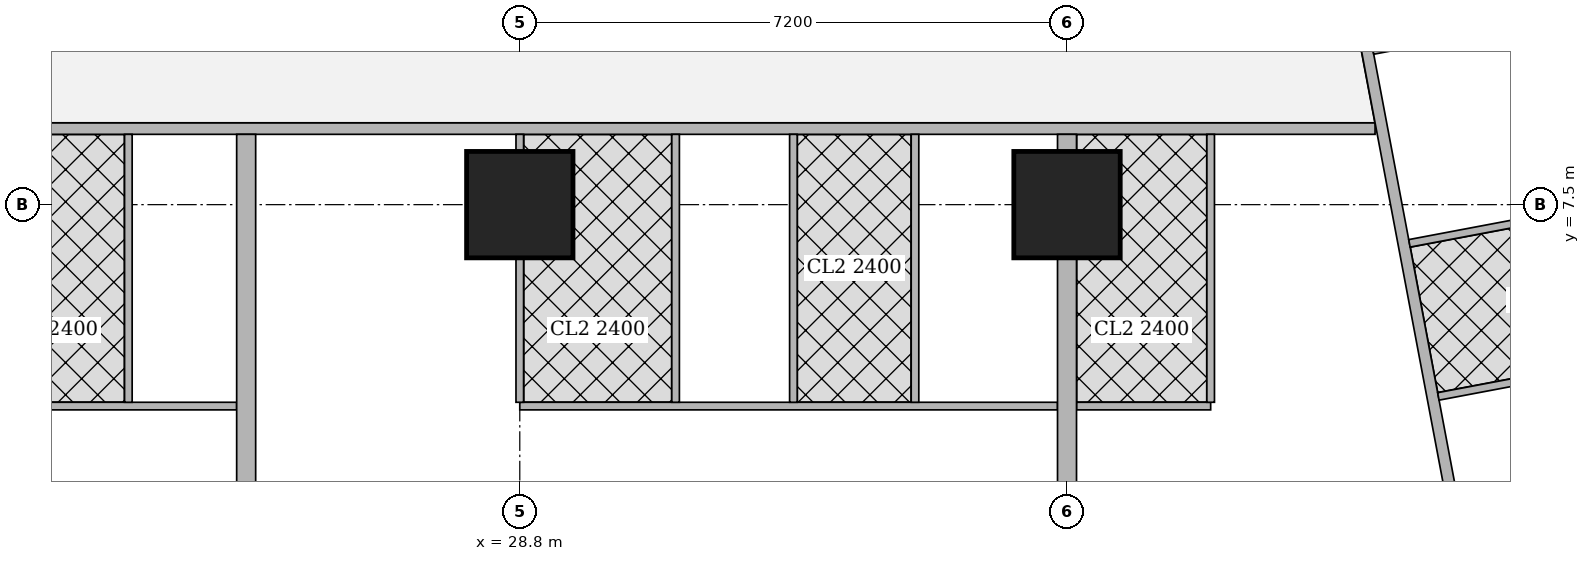
"""IFC4 building model, lengths in metres.
Left out: names, types, materials, properties, quantities, classifications, styles, units other than length and angle.
Written with IfcOpenShell. Run it as: python <this file> out.ifc"""

import sys

from ifc_helpers import new_model, si_unit, direction, frame, frame_2d, origin, origin_2d, place, context, subcontext, project, spatial, rectangle, extrude, element, fill, save


model = new_model("IFC4")
c1 = context("Model", 3, precision=1e-05, world=origin(), true_north=direction((0.0, 1.0)))
c2 = subcontext(c1, "Body", "Model", "MODEL_VIEW")
j1 = project(units=[si_unit("LENGTHUNIT", "METRE"), si_unit("PLANEANGLEUNIT", "RADIAN")], contexts=[c1])
p1 = place(None, origin())
s1 = spatial("IfcSite", under=j1, at=p1, CompositionType="ELEMENT")
p2 = place(p1, origin())
s2 = spatial("IfcBuilding", under=s1, at=p2, CompositionType="ELEMENT")
p3 = place(p2, frame((0.0, 0.0, 223.7)))
s3 = spatial("IfcBuildingStorey", under=s2, at=p3, CompositionType="ELEMENT", Elevation=223.7)
for number, where, z_axis, x_axis in (
    (1, (28.8, 7.5, 0.0), (0.0, 0.0, 1.0), (1.0, 0.0, 0.0)),
    (2, (36.0, 7.5, 0.0), (0.0, 0.0, 1.0), (1.0, 0.0, 0.0)),
):
    element("IfcColumn", number, at=place(p3, frame(where, z_axis=z_axis, x_axis=x_axis)), inside=s3, PredefinedType="COLUMN", context=c2, shape_type="SweptSolid", body=[
        extrude(rectangle(XDim=1.4, YDim=1.4, at=origin_2d()), origin(), (0.0, 0.0, 1.0), 3.75),
    ])
p4 = place(p3, frame((40.053, 8.5, 0.0), z_axis=(0.0, 0.0, 1.0), x_axis=(-1.0, 0.0, 0.0)))
e3 = element("IfcWall", 3, at=p4, inside=s3, PredefinedType="SOLIDWALL", context=c2, shape_type="SweptSolid", body=[
    extrude(rectangle(XDim=23.798, YDim=0.15, at=frame_2d((11.899, 0.0))), origin(), (0.0, 0.0, 1.0), 3.5),
])
p5 = place(p4, frame((21.978, 0.0, 0.0)))
e4 = element("IfcOpeningElement", 4, at=p5, cuts=e3, PredefinedType="OPENING", context=c2, shape_type="SweptSolid", body=[
    extrude(rectangle(XDim=1.0, YDim=2.1, at=frame_2d((0.5, 1.05))), frame((0.0, 0.085, 0.0), z_axis=(0.0, -1.0, 0.0), x_axis=(1.0, 0.0, 0.0)), (0.0, 0.0, 1.0), 0.17),
])
p6 = place(p4, frame((12.753, 0.0, 0.0)))
e5 = element("IfcOpeningElement", 5, at=p6, cuts=e3, PredefinedType="OPENING", context=c2, shape_type="SweptSolid", body=[
    extrude(rectangle(XDim=1.0, YDim=2.1, at=frame_2d((0.5, 1.05))), frame((0.0, 0.085, 0.0), z_axis=(0.0, -1.0, 0.0), x_axis=(1.0, 0.0, 0.0)), (0.0, 0.0, 1.0), 0.17),
])
p7 = place(p4, frame((0.15, 0.0, 0.0)))
e6 = element("IfcOpeningElement", 6, at=p7, cuts=e3, PredefinedType="OPENING", context=c2, shape_type="SweptSolid", body=[
    extrude(rectangle(XDim=1.0, YDim=2.1, at=frame_2d((0.5, 1.05))), frame((0.0, 0.085, 0.0), z_axis=(0.0, -1.0, 0.0), x_axis=(1.0, 0.0, 0.0)), (0.0, 0.0, 1.0), 0.17),
])
p8 = place(p3, frame((33.68, 42.723, 0.0), z_axis=(0.0, 0.0, 1.0), x_axis=(0.185601160014, -0.982625162207, 0.0)))
e7 = element("IfcWall", 7, at=p8, inside=s3, PredefinedType="SOLIDWALL", context=c2, shape_type="SweptSolid", body=[
    extrude(rectangle(XDim=41.051, YDim=0.15, at=frame_2d((20.526, 0.0))), origin(), (0.0, 0.0, 1.0), 2.5),
])
p9 = place(p8, frame((16.123, 0.0, 0.0)))
e8 = element("IfcOpeningElement", 8, at=p9, cuts=e7, PredefinedType="OPENING", context=c2, shape_type="SweptSolid", body=[
    extrude(rectangle(XDim=1.0, YDim=2.1, at=frame_2d((0.5, 1.05))), frame((0.0, 0.085, 0.0), z_axis=(0.0, -1.0, 0.0), x_axis=(1.0, 0.0, 0.0)), (0.0, 0.0, 1.0), 0.17),
])
p10 = place(p8, frame((19.938, 0.0, 0.0)))
e9 = element("IfcOpeningElement", 9, at=p10, cuts=e7, PredefinedType="OPENING", context=c2, shape_type="SweptSolid", body=[
    extrude(rectangle(XDim=1.0, YDim=2.1, at=frame_2d((0.5, 1.05))), frame((0.0, 0.085, 0.0), z_axis=(0.0, -1.0, 0.0), x_axis=(1.0, 0.0, 0.0)), (0.0, 0.0, 1.0), 0.17),
])
p11 = place(p8, frame((30.902, 0.0, 0.0)))
e10 = element("IfcOpeningElement", 10, at=p11, cuts=e7, PredefinedType="OPENING", context=c2, shape_type="SweptSolid", body=[
    extrude(rectangle(XDim=1.0, YDim=2.1, at=frame_2d((0.5, 1.05))), frame((0.0, 0.085, 0.0), z_axis=(0.0, -1.0, 0.0), x_axis=(1.0, 0.0, 0.0)), (0.0, 0.0, 1.0), 0.17),
])
p12 = place(p3, frame((25.075, 4.85, 0.0), z_axis=(0.0, 0.0, 1.0), x_axis=(-1.0, 0.0, 0.0)))
e11 = element("IfcWall", 11, at=p12, inside=s3, PredefinedType="PARTITIONING", context=c2, shape_type="SweptSolid", body=[
    extrude(rectangle(XDim=3.475, YDim=0.1, at=frame_2d((1.737, 0.0))), origin(), (0.0, 0.0, 1.0), 3.5),
])
p13 = place(p12, frame((2.0, 0.0, 0.0)))
e12 = element("IfcOpeningElement", 12, at=p13, cuts=e11, PredefinedType="OPENING", context=c2, shape_type="SweptSolid", body=[
    extrude(rectangle(XDim=0.9, YDim=2.1, at=frame_2d((0.45, 1.05))), frame((0.0, 0.06, 0.0), z_axis=(0.0, -1.0, 0.0), x_axis=(1.0, 0.0, 0.0)), (0.0, 0.0, 1.0), 0.12),
])
p14 = place(p12, frame((0.2, 0.0, 0.0)))
e13 = element("IfcOpeningElement", 13, at=p14, cuts=e11, PredefinedType="OPENING", context=c2, shape_type="SweptSolid", body=[
    extrude(rectangle(XDim=0.9, YDim=2.1, at=frame_2d((0.45, 1.05))), frame((0.0, 0.06, 0.0), z_axis=(0.0, -1.0, 0.0), x_axis=(1.0, 0.0, 0.0)), (0.0, 0.0, 1.0), 0.12),
])
p15 = place(p3, frame((23.65, 4.9, 0.0), z_axis=(0.0, 0.0, 1.0), x_axis=(0.0, 1.0, 0.0)))
e14 = element("IfcWall", 14, at=p15, inside=s3, PredefinedType="PARTITIONING", context=c2, shape_type="SweptSolid", body=[
    extrude(rectangle(XDim=3.525, YDim=0.1, at=frame_2d((1.763, 0.0))), origin(), (0.0, 0.0, 1.0), 3.5),
])
p16 = place(p3, frame((35.875, 4.85, 0.0), z_axis=(0.0, 0.0, 1.0), x_axis=(-1.0, 0.0, 0.0)))
e15 = element("IfcWall", 15, at=p16, inside=s3, PredefinedType="PARTITIONING", context=c2, shape_type="SweptSolid", body=[
    extrude(rectangle(XDim=7.075, YDim=0.1, at=frame_2d((3.538, 0.0))), origin(), (0.0, 0.0, 1.0), 3.5),
])
p17 = place(p16, frame((5.6, 0.0, 0.0)))
e16 = element("IfcOpeningElement", 16, at=p17, cuts=e15, PredefinedType="OPENING", context=c2, shape_type="SweptSolid", body=[
    extrude(rectangle(XDim=0.9, YDim=2.1, at=frame_2d((0.45, 1.05))), frame((0.0, 0.06, 0.0), z_axis=(0.0, -1.0, 0.0), x_axis=(1.0, 0.0, 0.0)), (0.0, 0.0, 1.0), 0.12),
])
p18 = place(p16, frame((2.225, 0.0, 0.0)))
e17 = element("IfcOpeningElement", 17, at=p18, cuts=e15, PredefinedType="OPENING", context=c2, shape_type="SweptSolid", body=[
    extrude(rectangle(XDim=0.9, YDim=2.1, at=frame_2d((0.45, 1.05))), frame((0.0, 0.06, 0.0), z_axis=(0.0, -1.0, 0.0), x_axis=(1.0, 0.0, 0.0)), (0.0, 0.0, 1.0), 0.12),
])
p19 = place(p16, frame((3.8, 0.0, 0.0)))
e18 = element("IfcOpeningElement", 18, at=p19, cuts=e15, PredefinedType="OPENING", context=c2, shape_type="SweptSolid", body=[
    extrude(rectangle(XDim=0.9, YDim=2.1, at=frame_2d((0.45, 1.05))), frame((0.0, 0.06, 0.0), z_axis=(0.0, -1.0, 0.0), x_axis=(1.0, 0.0, 0.0)), (0.0, 0.0, 1.0), 0.12),
])
p20 = place(p16, frame((0.425, 0.0, 0.0)))
e19 = element("IfcOpeningElement", 19, at=p20, cuts=e15, PredefinedType="OPENING", context=c2, shape_type="SweptSolid", body=[
    extrude(rectangle(XDim=0.9, YDim=2.1, at=frame_2d((0.45, 1.05))), frame((0.0, 0.06, 0.0), z_axis=(0.0, -1.0, 0.0), x_axis=(1.0, 0.0, 0.0)), (0.0, 0.0, 1.0), 0.12),
])
p21 = place(p3, frame((28.8, 4.9, 0.0), z_axis=(0.0, 0.0, 1.0), x_axis=(0.0, 1.0, 0.0)))
e20 = element("IfcWall", 20, at=p21, inside=s3, PredefinedType="PARTITIONING", context=c2, shape_type="SweptSolid", body=[
    extrude(rectangle(XDim=1.899, YDim=0.1, at=frame_2d((0.95, 0.0))), origin(), (0.0, 0.0, 1.0), 3.5),
])
p22 = place(p3, frame((28.8, 8.201, 0.0), z_axis=(0.0, 0.0, 1.0), x_axis=(0.0, 1.0, 0.0)))
e21 = element("IfcWall", 21, at=p22, inside=s3, PredefinedType="PARTITIONING", context=c2, shape_type="SweptSolid", body=[
    extrude(rectangle(XDim=0.224, YDim=0.1, at=frame_2d((0.112, 0.0))), origin(), (0.0, 0.0, 1.0), 3.5),
])
for number, where, z_axis, x_axis in (
    (22, (32.4, 4.9, 0.0), (0.0, 0.0, 1.0), (0.0, 1.0, 0.0)),
    (23, (30.85, 4.9, 0.0), (0.0, 0.0, 1.0), (0.0, 1.0, 0.0)),
    (24, (34.0, 4.9, 0.0), (0.0, 0.0, 1.0), (0.0, 1.0, 0.0)),
):
    element("IfcWall", number, at=place(p3, frame(where, z_axis=z_axis, x_axis=x_axis)), inside=s3, PredefinedType="PARTITIONING", context=c2, shape_type="SweptSolid", body=[
        extrude(rectangle(XDim=3.525, YDim=0.1, at=frame_2d((1.763, 0.0))), origin(), (0.0, 0.0, 1.0), 3.5),
    ])
p23 = place(p3, frame((25.2, 3.65, 0.0), z_axis=(0.0, 0.0, 1.0), x_axis=(0.0, 1.0, 0.0)))
e25 = element("IfcWall", 25, at=p23, inside=s3, PredefinedType="SOLIDWALL", context=c2, shape_type="SweptSolid", body=[
    extrude(rectangle(XDim=4.775, YDim=0.25, at=frame_2d((2.388, 0.0))), origin(), (0.0, 0.0, 1.0), 3.5),
])
p24 = place(p3, frame((37.89, 4.85, 0.0), z_axis=(0.0, 0.0, 1.0), x_axis=(-1.0, 0.0, 0.0)))
e26 = element("IfcWall", 26, at=p24, inside=s3, PredefinedType="PARTITIONING", context=c2, shape_type="SweptSolid", body=[
    extrude(rectangle(XDim=1.765, YDim=0.1, at=frame_2d((0.882, 0.0))), origin(), (0.0, 0.0, 1.0), 3.5),
])
p25 = place(p24, frame((0.49, 0.0, 0.0)))
e27 = element("IfcOpeningElement", 27, at=p25, cuts=e26, PredefinedType="OPENING", context=c2, shape_type="SweptSolid", body=[
    extrude(rectangle(XDim=0.9, YDim=2.1, at=frame_2d((0.45, 1.05))), frame((0.0, 0.06, 0.0), z_axis=(0.0, -1.0, 0.0), x_axis=(1.0, 0.0, 0.0)), (0.0, 0.0, 1.0), 0.12),
])
p26 = place(p3, frame((37.89, 4.9, 0.0), z_axis=(0.0, 0.0, 1.0), x_axis=(0.0, 1.0, 0.0)))
e28 = element("IfcWall", 28, at=p26, inside=s3, PredefinedType="PARTITIONING", context=c2, shape_type="SweptSolid", body=[
    extrude(rectangle(XDim=3.525, YDim=0.1, at=frame_2d((1.763, 0.0))), origin(), (0.0, 0.0, 1.0), 3.5),
])
p27 = place(p3, frame((36.0, 3.65, 0.0), z_axis=(0.0, 0.0, 1.0), x_axis=(0.0, 1.0, 0.0)))
e29 = element("IfcWall", 29, at=p27, inside=s3, PredefinedType="SOLIDWALL", context=c2, shape_type="SweptSolid", body=[
    extrude(rectangle(XDim=3.149, YDim=0.25, at=frame_2d((1.575, 0.0))), origin(), (0.0, 0.0, 1.0), 3.5),
])
p28 = place(p3, frame((36.0, 8.201, 0.0), z_axis=(0.0, 0.0, 1.0), x_axis=(0.0, 1.0, 0.0)))
e30 = element("IfcWall", 30, at=p28, inside=s3, PredefinedType="SOLIDWALL", context=c2, shape_type="SweptSolid", body=[
    extrude(rectangle(XDim=0.224, YDim=0.25, at=frame_2d((0.112, 0.0))), origin(), (0.0, 0.0, 1.0), 3.5),
])
p29 = place(p3, frame((43.49, 10.183, 0.0), z_axis=(0.0, 0.0, 1.0), x_axis=(-0.982588017646, -0.185797706064, 0.0)))
e31 = element("IfcWall", 31, at=p29, inside=s3, PredefinedType="PARTITIONING", context=c2, shape_type="SweptSolid", body=[
    extrude(rectangle(XDim=3.525, YDim=0.1, at=frame_2d((1.763, 0.0))), origin(), (0.0, 0.0, 1.0), 3.5),
])
p30 = place(p29, frame((1.325, 0.0, 0.0)))
e32 = element("IfcOpeningElement", 32, at=p30, cuts=e31, PredefinedType="OPENING", context=c2, shape_type="SweptSolid", body=[
    extrude(rectangle(XDim=0.9, YDim=2.1, at=frame_2d((0.45, 1.05))), frame((0.0, 0.06, 0.0), z_axis=(0.0, -1.0, 0.0), x_axis=(1.0, 0.0, 0.0)), (0.0, 0.0, 1.0), 0.12),
])
p31 = place(p3, frame((42.49, 7.366, 0.0), z_axis=(0.0, 0.0, 1.0), x_axis=(-0.982620917875, -0.185623629302, 0.0)))
e33 = element("IfcWall", 33, at=p31, inside=s3, PredefinedType="PARTITIONING", context=c2, shape_type="SweptSolid", body=[
    extrude(rectangle(XDim=2.02, YDim=0.1, at=frame_2d((1.01, 0.0))), origin(), (0.0, 0.0, 1.0), 3.5),
])
p32 = place(p3, frame((44.35, 5.631, 0.0), z_axis=(0.0, 0.0, 1.0), x_axis=(-0.982638553676, -0.185530247748, 0.0)))
e34 = element("IfcWall", 34, at=p32, inside=s3, PredefinedType="PARTITIONING", context=c2, shape_type="SweptSolid", body=[
    extrude(rectangle(XDim=3.525, YDim=0.1, at=frame_2d((1.763, 0.0))), origin(), (0.0, 0.0, 1.0), 3.5),
])
p33 = place(p3, frame((41.192, 3.356, 0.0), z_axis=(0.0, 0.0, 1.0), x_axis=(0.982588017646, 0.185797706064, 0.0)))
e35 = element("IfcWall", 35, at=p33, inside=s3, PredefinedType="PARTITIONING", context=c2, shape_type="SweptSolid", body=[
    extrude(rectangle(XDim=3.525, YDim=0.1, at=frame_2d((1.763, 0.0))), origin(), (0.0, 0.0, 1.0), 3.5),
])
p34 = place(p33, frame((1.7, 0.0, 0.0)))
e36 = element("IfcOpeningElement", 36, at=p34, cuts=e35, PredefinedType="OPENING", context=c2, shape_type="SweptSolid", body=[
    extrude(rectangle(XDim=0.9, YDim=2.1, at=frame_2d((0.45, 1.05))), frame((0.0, 0.06, 0.0), z_axis=(0.0, -1.0, 0.0), x_axis=(1.0, 0.0, 0.0)), (0.0, 0.0, 1.0), 0.12),
])
p35 = place(p13, origin())
e37 = element("IfcDoor", 37, at=p35, inside=s3, OperationType="SINGLE_SWING_LEFT", PredefinedType="DOOR", context=c2, shape_type="SweptSolid", body=[
    extrude(rectangle(XDim=0.9, YDim=2.1, at=frame_2d((0.45, 1.05))), frame((0.0, 0.025, 0.0), z_axis=(0.0, -1.0, 0.0), x_axis=(1.0, 0.0, 0.0)), (0.0, 0.0, 1.0), 0.05),
])
fill(e12, e37)
p36 = place(p14, origin())
e38 = element("IfcDoor", 38, at=p36, inside=s3, OperationType="SINGLE_SWING_RIGHT", PredefinedType="DOOR", context=c2, shape_type="SweptSolid", body=[
    extrude(rectangle(XDim=0.9, YDim=2.1, at=frame_2d((0.45, 1.05))), frame((0.0, 0.025, 0.0), z_axis=(0.0, -1.0, 0.0), x_axis=(1.0, 0.0, 0.0)), (0.0, 0.0, 1.0), 0.05),
])
fill(e13, e38)
p37 = place(p17, origin())
e39 = element("IfcDoor", 39, at=p37, inside=s3, OperationType="SINGLE_SWING_LEFT", PredefinedType="DOOR", context=c2, shape_type="SweptSolid", body=[
    extrude(rectangle(XDim=0.9, YDim=2.1, at=frame_2d((0.45, 1.05))), frame((0.0, 0.025, 0.0), z_axis=(0.0, -1.0, 0.0), x_axis=(1.0, 0.0, 0.0)), (0.0, 0.0, 1.0), 0.05),
])
fill(e16, e39)
p38 = place(p18, origin())
e40 = element("IfcDoor", 40, at=p38, inside=s3, OperationType="SINGLE_SWING_LEFT", PredefinedType="DOOR", context=c2, shape_type="SweptSolid", body=[
    extrude(rectangle(XDim=0.9, YDim=2.1, at=frame_2d((0.45, 1.05))), frame((0.0, 0.025, 0.0), z_axis=(0.0, -1.0, 0.0), x_axis=(1.0, 0.0, 0.0)), (0.0, 0.0, 1.0), 0.05),
])
fill(e17, e40)
p39 = place(p19, origin())
e41 = element("IfcDoor", 41, at=p39, inside=s3, OperationType="SINGLE_SWING_LEFT", PredefinedType="DOOR", context=c2, shape_type="SweptSolid", body=[
    extrude(rectangle(XDim=0.9, YDim=2.1, at=frame_2d((0.45, 1.05))), frame((0.0, 0.025, 0.0), z_axis=(0.0, -1.0, 0.0), x_axis=(1.0, 0.0, 0.0)), (0.0, 0.0, 1.0), 0.05),
])
fill(e18, e41)
p40 = place(p20, origin())
e42 = element("IfcDoor", 42, at=p40, inside=s3, OperationType="SINGLE_SWING_RIGHT", PredefinedType="DOOR", context=c2, shape_type="SweptSolid", body=[
    extrude(rectangle(XDim=0.9, YDim=2.1, at=frame_2d((0.45, 1.05))), frame((0.0, 0.025, 0.0), z_axis=(0.0, -1.0, 0.0), x_axis=(1.0, 0.0, 0.0)), (0.0, 0.0, 1.0), 0.05),
])
fill(e19, e42)
p41 = place(p6, origin())
e43 = element("IfcDoor", 43, at=p41, inside=s3, OperationType="SINGLE_SWING_RIGHT", PredefinedType="DOOR", context=c2, shape_type="SweptSolid", body=[
    extrude(rectangle(XDim=1.0, YDim=2.1, at=frame_2d((0.5, 1.05))), frame((0.0, 0.025, 0.0), z_axis=(0.0, -1.0, 0.0), x_axis=(1.0, 0.0, 0.0)), (0.0, 0.0, 1.0), 0.05),
])
fill(e5, e43)
p42 = place(p25, origin())
e44 = element("IfcDoor", 44, at=p42, inside=s3, OperationType="SINGLE_SWING_LEFT", PredefinedType="DOOR", context=c2, shape_type="SweptSolid", body=[
    extrude(rectangle(XDim=0.9, YDim=2.1, at=frame_2d((0.45, 1.05))), frame((0.0, 0.025, 0.0), z_axis=(0.0, -1.0, 0.0), x_axis=(1.0, 0.0, 0.0)), (0.0, 0.0, 1.0), 0.05),
])
fill(e27, e44)
p43 = place(p7, origin())
e45 = element("IfcDoor", 45, at=p43, inside=s3, OperationType="SINGLE_SWING_LEFT", PredefinedType="DOOR", context=c2, shape_type="SweptSolid", body=[
    extrude(rectangle(XDim=1.0, YDim=2.1, at=frame_2d((0.5, 1.05))), frame((0.0, 0.025, 0.0), z_axis=(0.0, -1.0, 0.0), x_axis=(1.0, 0.0, 0.0)), (0.0, 0.0, 1.0), 0.05),
])
fill(e6, e45)
save(model, sys.argv[1])
